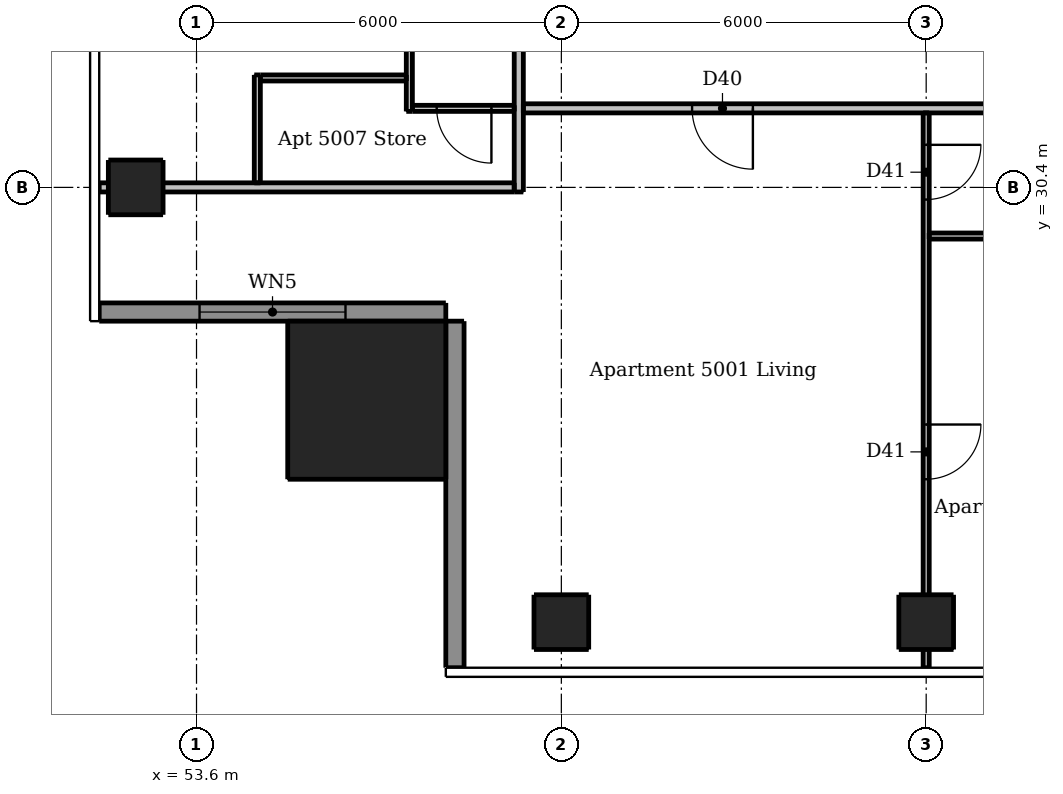
"""IFC4 building model, lengths in metres.
Left out: names, types, materials, properties, quantities, classifications, styles, units other than length and angle.
Written with IfcOpenShell. Run it as: python <this file> out.ifc"""

import sys

from ifc_helpers import new_model, si_unit, direction, frame, frame_2d, origin, origin_2d, place, context, subcontext, project, spatial, rectangle, extrude, element, fill, save


model = new_model("IFC4")
c1 = context("Model", 3, precision=1e-05, world=origin(), true_north=direction((0.0, 1.0)))
c2 = subcontext(c1, "Body", "Model", "MODEL_VIEW")
j1 = project(units=[si_unit("LENGTHUNIT", "METRE"), si_unit("PLANEANGLEUNIT", "RADIAN")], contexts=[c1])
p1 = place(None, origin())
s1 = spatial("IfcSite", under=j1, at=p1, CompositionType="ELEMENT")
p2 = place(p1, origin())
s2 = spatial("IfcBuilding", under=s1, at=p2, CompositionType="ELEMENT")
p3 = place(p2, frame((0.0, 0.0, 190.3)))
s3 = spatial("IfcBuildingStorey", under=s2, at=p3, CompositionType="ELEMENT", Elevation=190.3)
for number, where, z_axis, x_axis in (
    (1, (59.6, 23.25, 0.0), (0.0, 0.0, 1.0), (1.0, 0.0, 0.0)),
    (2, (65.6, 23.25, 0.0), (0.0, 0.0, 1.0), (1.0, 0.0, 0.0)),
    (3, (52.6, 30.4, 0.0), (0.0, 0.0, 1.0), (1.0, 0.0, 0.0)),
):
    element("IfcColumn", number, at=place(p3, frame(where, z_axis=z_axis, x_axis=x_axis)), inside=s3, PredefinedType="COLUMN", context=c2, shape_type="SweptSolid", body=[
        extrude(rectangle(XDim=0.9, YDim=0.9, at=origin_2d()), origin(), (0.0, 0.0, 1.0), 3.05),
    ])
p4 = place(p3, frame((56.4, 26.9, 0.0), z_axis=(0.0, 0.0, 1.0), x_axis=(1.0, 0.0, 0.0)))
e4 = element("IfcColumn", 4, at=p4, inside=s3, PredefinedType="COLUMN", context=c2, shape_type="SweptSolid", body=[
    extrude(rectangle(XDim=2.6, YDim=2.6, at=origin_2d()), origin(), (0.0, 0.0, 1.0), 3.3),
])
p5 = place(p3, frame((52.0, 28.35, 0.0), z_axis=(0.0, 0.0, 1.0), x_axis=(1.0, 0.0, 0.0)))
e5 = element("IfcWall", 5, at=p5, inside=s3, PredefinedType="SOLIDWALL", context=c2, shape_type="SweptSolid", body=[
    extrude(rectangle(XDim=5.7, YDim=0.3, at=frame_2d((2.85, 0.0))), origin(), (0.0, 0.0, 1.0), 3.05),
])
p6 = place(p5, frame((1.65, 0.0, 0.15)))
e6 = element("IfcOpeningElement", 6, at=p6, cuts=e5, PredefinedType="OPENING", context=c2, shape_type="SweptSolid", body=[
    extrude(rectangle(XDim=2.4, YDim=2.1, at=frame_2d((1.2, 1.05))), frame((0.0, 0.16, 0.0), z_axis=(0.0, -1.0, 0.0), x_axis=(1.0, 0.0, 0.0)), (0.0, 0.0, 1.0), 0.32),
])
p7 = place(p3, frame((57.85, 28.2, 0.0), z_axis=(0.0, 0.0, 1.0), x_axis=(0.0, -1.0, 0.0)))
e7 = element("IfcWall", 7, at=p7, inside=s3, PredefinedType="SOLIDWALL", context=c2, shape_type="SweptSolid", body=[
    extrude(rectangle(XDim=5.7, YDim=0.3, at=frame_2d((2.85, 0.0))), origin(), (0.0, 0.0, 1.0), 3.05),
])
p8 = place(p3, frame((54.6, 30.475, 0.0), z_axis=(0.0, 0.0, 1.0), x_axis=(0.0, 1.0, 0.0)))
e8 = element("IfcWall", 8, at=p8, inside=s3, PredefinedType="PARTITIONING", context=c2, shape_type="SweptSolid", body=[
    extrude(rectangle(XDim=1.775, YDim=0.1, at=frame_2d((0.887, 0.0))), origin(), (0.0, 0.0, 1.0), 3.05),
])
p9 = place(p3, frame((57.1, 31.65, 0.0), z_axis=(0.0, 0.0, 1.0), x_axis=(0.0, 1.0, 0.0)))
e9 = element("IfcWall", 9, at=p9, inside=s3, PredefinedType="PARTITIONING", context=c2, shape_type="SweptSolid", body=[
    extrude(rectangle(XDim=16.675, YDim=0.1, at=frame_2d((8.337, 0.0))), origin(), (0.0, 0.0, 1.0), 3.05),
])
p10 = place(p9, frame((3.7, 0.0, 0.0)))
e10 = element("IfcOpeningElement", 10, at=p10, cuts=e9, PredefinedType="OPENING", context=c2, shape_type="SweptSolid", body=[
    extrude(rectangle(XDim=0.9, YDim=2.1, at=frame_2d((0.45, 1.05))), frame((0.0, 0.06, 0.0), z_axis=(0.0, -1.0, 0.0), x_axis=(1.0, 0.0, 0.0)), (0.0, 0.0, 1.0), 0.12),
])
p11 = place(p9, frame((8.8, 0.0, 0.0)))
e11 = element("IfcOpeningElement", 11, at=p11, cuts=e9, PredefinedType="OPENING", context=c2, shape_type="SweptSolid", body=[
    extrude(rectangle(XDim=0.9, YDim=2.1, at=frame_2d((0.45, 1.05))), frame((0.0, 0.06, 0.0), z_axis=(0.0, -1.0, 0.0), x_axis=(1.0, 0.0, 0.0)), (0.0, 0.0, 1.0), 0.12),
])
p12 = place(p9, frame((14.5, 0.0, 0.0)))
e12 = element("IfcOpeningElement", 12, at=p12, cuts=e9, PredefinedType="OPENING", context=c2, shape_type="SweptSolid", body=[
    extrude(rectangle(XDim=0.9, YDim=2.1, at=frame_2d((0.45, 1.05))), frame((0.0, 0.06, 0.0), z_axis=(0.0, -1.0, 0.0), x_axis=(1.0, 0.0, 0.0)), (0.0, 0.0, 1.0), 0.12),
])
p13 = place(p9, frame((11.55, 0.0, 0.0)))
e13 = element("IfcOpeningElement", 13, at=p13, cuts=e9, PredefinedType="OPENING", context=c2, shape_type="SweptSolid", body=[
    extrude(rectangle(XDim=0.8, YDim=2.1, at=frame_2d((0.4, 1.05))), frame((0.0, 0.06, 0.0), z_axis=(0.0, -1.0, 0.0), x_axis=(1.0, 0.0, 0.0)), (0.0, 0.0, 1.0), 0.12),
])
p14 = place(p3, frame((65.6, 31.625, 0.0), z_axis=(0.0, 0.0, 1.0), x_axis=(0.0, -1.0, 0.0)))
e14 = element("IfcWall", 14, at=p14, inside=s3, PredefinedType="PARTITIONING", context=c2, shape_type="SweptSolid", body=[
    extrude(rectangle(XDim=9.125, YDim=0.1, at=frame_2d((4.562, 0.0))), origin(), (0.0, 0.0, 1.0), 2.516),
])
p15 = place(p14, frame((0.525, 0.0, 0.0)))
e15 = element("IfcOpeningElement", 15, at=p15, cuts=e14, PredefinedType="OPENING", context=c2, shape_type="SweptSolid", body=[
    extrude(rectangle(XDim=0.9, YDim=2.1, at=frame_2d((0.45, 1.05))), frame((0.0, 0.06, 0.0), z_axis=(0.0, -1.0, 0.0), x_axis=(1.0, 0.0, 0.0)), (0.0, 0.0, 1.0), 0.12),
])
p16 = place(p14, frame((5.125, 0.0, 0.0)))
e16 = element("IfcOpeningElement", 16, at=p16, cuts=e14, PredefinedType="OPENING", context=c2, shape_type="SweptSolid", body=[
    extrude(rectangle(XDim=0.9, YDim=2.1, at=frame_2d((0.45, 1.05))), frame((0.0, 0.06, 0.0), z_axis=(0.0, -1.0, 0.0), x_axis=(1.0, 0.0, 0.0)), (0.0, 0.0, 1.0), 0.12),
])
p17 = place(p3, frame((54.65, 32.2, 0.0), z_axis=(0.0, 0.0, 1.0), x_axis=(1.0, 0.0, 0.0)))
e17 = element("IfcWall", 17, at=p17, inside=s3, PredefinedType="PARTITIONING", context=c2, shape_type="SweptSolid", body=[
    extrude(rectangle(XDim=2.4, YDim=0.1, at=frame_2d((1.2, 0.0))), origin(), (0.0, 0.0, 1.0), 3.05),
])
p18 = place(p3, frame((58.825, 31.7, 0.0), z_axis=(0.0, 0.0, 1.0), x_axis=(-1.0, 0.0, 0.0)))
e18 = element("IfcWall", 18, at=p18, inside=s3, PredefinedType="PARTITIONING", context=c2, shape_type="SweptSolid", body=[
    extrude(rectangle(XDim=1.675, YDim=0.1, at=frame_2d((0.837, 0.0))), origin(), (0.0, 0.0, 1.0), 3.05),
])
p19 = place(p18, frame((0.375, 0.0, 0.0)))
e19 = element("IfcOpeningElement", 19, at=p19, cuts=e18, PredefinedType="OPENING", context=c2, shape_type="SweptSolid", body=[
    extrude(rectangle(XDim=0.9, YDim=2.1, at=frame_2d((0.45, 1.05))), frame((0.0, 0.06, 0.0), z_axis=(0.0, -1.0, 0.0), x_axis=(1.0, 0.0, 0.0)), (0.0, 0.0, 1.0), 0.12),
])
p20 = place(p3, frame((65.65, 29.6, 0.0), z_axis=(0.0, 0.0, 1.0), x_axis=(1.0, 0.0, 0.0)))
e20 = element("IfcWall", 20, at=p20, inside=s3, PredefinedType="PARTITIONING", context=c2, shape_type="SweptSolid", body=[
    extrude(rectangle(XDim=5.875, YDim=0.1, at=frame_2d((2.938, 0.0))), origin(), (0.0, 0.0, 1.0), 3.05),
])
p21 = place(p20, frame((3.75, 0.0, 0.0)))
e21 = element("IfcOpeningElement", 21, at=p21, cuts=e20, PredefinedType="OPENING", context=c2, shape_type="SweptSolid", body=[
    extrude(rectangle(XDim=0.8, YDim=2.1, at=frame_2d((0.4, 1.05))), frame((0.0, 0.06, 0.0), z_axis=(0.0, -1.0, 0.0), x_axis=(1.0, 0.0, 0.0)), (0.0, 0.0, 1.0), 0.12),
])
p22 = place(p3, frame((58.9, 30.325, 0.0), z_axis=(0.0, 0.0, 1.0), x_axis=(0.0, 1.0, 0.0)))
e22 = element("IfcWall", 22, at=p22, inside=s3, PredefinedType="PARTITIONING", context=c2, shape_type="SweptSolid", body=[
    extrude(rectangle(XDim=30.85, YDim=0.15, at=frame_2d((15.425, 0.0))), origin(), (0.0, 0.0, 1.0), 3.05),
])
p23 = place(p22, frame((9.225, 0.0, 0.0)))
e23 = element("IfcOpeningElement", 23, at=p23, cuts=e22, PredefinedType="OPENING", context=c2, shape_type="SweptSolid", body=[
    extrude(rectangle(XDim=1.0, YDim=2.1, at=frame_2d((0.5, 1.05))), frame((0.0, 0.085, 0.0), z_axis=(0.0, -1.0, 0.0), x_axis=(1.0, 0.0, 0.0)), (0.0, 0.0, 1.0), 0.17),
])
p24 = place(p22, frame((26.925, 0.0, 0.0)))
e24 = element("IfcOpeningElement", 24, at=p24, cuts=e22, PredefinedType="OPENING", context=c2, shape_type="SweptSolid", body=[
    extrude(rectangle(XDim=1.0, YDim=2.1, at=frame_2d((0.5, 1.05))), frame((0.0, 0.085, 0.0), z_axis=(0.0, -1.0, 0.0), x_axis=(1.0, 0.0, 0.0)), (0.0, 0.0, 1.0), 0.17),
])
p25 = place(p3, frame((89.525, 31.7, 0.0), z_axis=(0.0, 0.0, 1.0), x_axis=(-1.0, 0.0, 0.0)))
e25 = element("IfcWall", 25, at=p25, inside=s3, PredefinedType="PARTITIONING", context=c2, shape_type="SweptSolid", body=[
    extrude(rectangle(XDim=30.55, YDim=0.15, at=frame_2d((15.275, 0.0))), origin(), (0.0, 0.0, 1.0), 3.05),
])
p26 = place(p25, frame((26.775, 0.0, 0.0)))
e26 = element("IfcOpeningElement", 26, at=p26, cuts=e25, PredefinedType="OPENING", context=c2, shape_type="SweptSolid", body=[
    extrude(rectangle(XDim=1.0, YDim=2.1, at=frame_2d((0.5, 1.05))), frame((0.0, 0.085, 0.0), z_axis=(0.0, -1.0, 0.0), x_axis=(1.0, 0.0, 0.0)), (0.0, 0.0, 1.0), 0.17),
])
p27 = place(p25, frame((9.075, 0.0, 0.0)))
e27 = element("IfcOpeningElement", 27, at=p27, cuts=e25, PredefinedType="OPENING", context=c2, shape_type="SweptSolid", body=[
    extrude(rectangle(XDim=1.0, YDim=2.1, at=frame_2d((0.5, 1.05))), frame((0.0, 0.085, 0.0), z_axis=(0.0, -1.0, 0.0), x_axis=(1.0, 0.0, 0.0)), (0.0, 0.0, 1.0), 0.17),
])
p28 = place(p3, frame((52.0, 30.4, 0.0), z_axis=(0.0, 0.0, 1.0), x_axis=(1.0, 0.0, 0.0)))
e28 = element("IfcWall", 28, at=p28, inside=s3, PredefinedType="PARTITIONING", context=c2, shape_type="SweptSolid", body=[
    extrude(rectangle(XDim=6.825, YDim=0.15, at=frame_2d((3.413, 0.0))), origin(), (0.0, 0.0, 1.0), 2.647),
])
p29 = place(p6, origin())
e29 = element("IfcWindow", 29, at=p29, inside=s3, PartitioningType="DOUBLE_PANEL_VERTICAL", PredefinedType="WINDOW", context=c2, shape_type="SweptSolid", body=[
    extrude(rectangle(XDim=2.4, YDim=2.1, at=frame_2d((1.2, 1.05))), frame((0.0, 0.03, 0.0), z_axis=(0.0, -1.0, 0.0), x_axis=(1.0, 0.0, 0.0)), (0.0, 0.0, 1.0), 0.06),
])
fill(e6, e29)
p30 = place(p26, origin())
e30 = element("IfcDoor", 30, at=p30, inside=s3, OperationType="SINGLE_SWING_LEFT", PredefinedType="DOOR", context=c2, shape_type="SweptSolid", body=[
    extrude(rectangle(XDim=1.0, YDim=2.1, at=frame_2d((0.5, 1.05))), frame((0.0, 0.025, 0.0), z_axis=(0.0, -1.0, 0.0), x_axis=(1.0, 0.0, 0.0)), (0.0, 0.0, 1.0), 0.05),
])
fill(e26, e30)
p31 = place(p15, origin())
e31 = element("IfcDoor", 31, at=p31, inside=s3, OperationType="SINGLE_SWING_LEFT", PredefinedType="DOOR", context=c2, shape_type="SweptSolid", body=[
    extrude(rectangle(XDim=0.9, YDim=2.1, at=frame_2d((0.45, 1.05))), frame((0.0, 0.025, 0.0), z_axis=(0.0, -1.0, 0.0), x_axis=(1.0, 0.0, 0.0)), (0.0, 0.0, 1.0), 0.05),
])
fill(e15, e31)
p32 = place(p16, origin())
e32 = element("IfcDoor", 32, at=p32, inside=s3, OperationType="SINGLE_SWING_LEFT", PredefinedType="DOOR", context=c2, shape_type="SweptSolid", body=[
    extrude(rectangle(XDim=0.9, YDim=2.1, at=frame_2d((0.45, 1.05))), frame((0.0, 0.025, 0.0), z_axis=(0.0, -1.0, 0.0), x_axis=(1.0, 0.0, 0.0)), (0.0, 0.0, 1.0), 0.05),
])
fill(e16, e32)
p33 = place(p19, origin())
e33 = element("IfcDoor", 33, at=p33, inside=s3, OperationType="SINGLE_SWING_LEFT", PredefinedType="DOOR", context=c2, shape_type="SweptSolid", body=[
    extrude(rectangle(XDim=0.9, YDim=2.1, at=frame_2d((0.45, 1.05))), frame((0.0, 0.025, 0.0), z_axis=(0.0, -1.0, 0.0), x_axis=(1.0, 0.0, 0.0)), (0.0, 0.0, 1.0), 0.05),
])
fill(e19, e33)
save(model, sys.argv[1])
